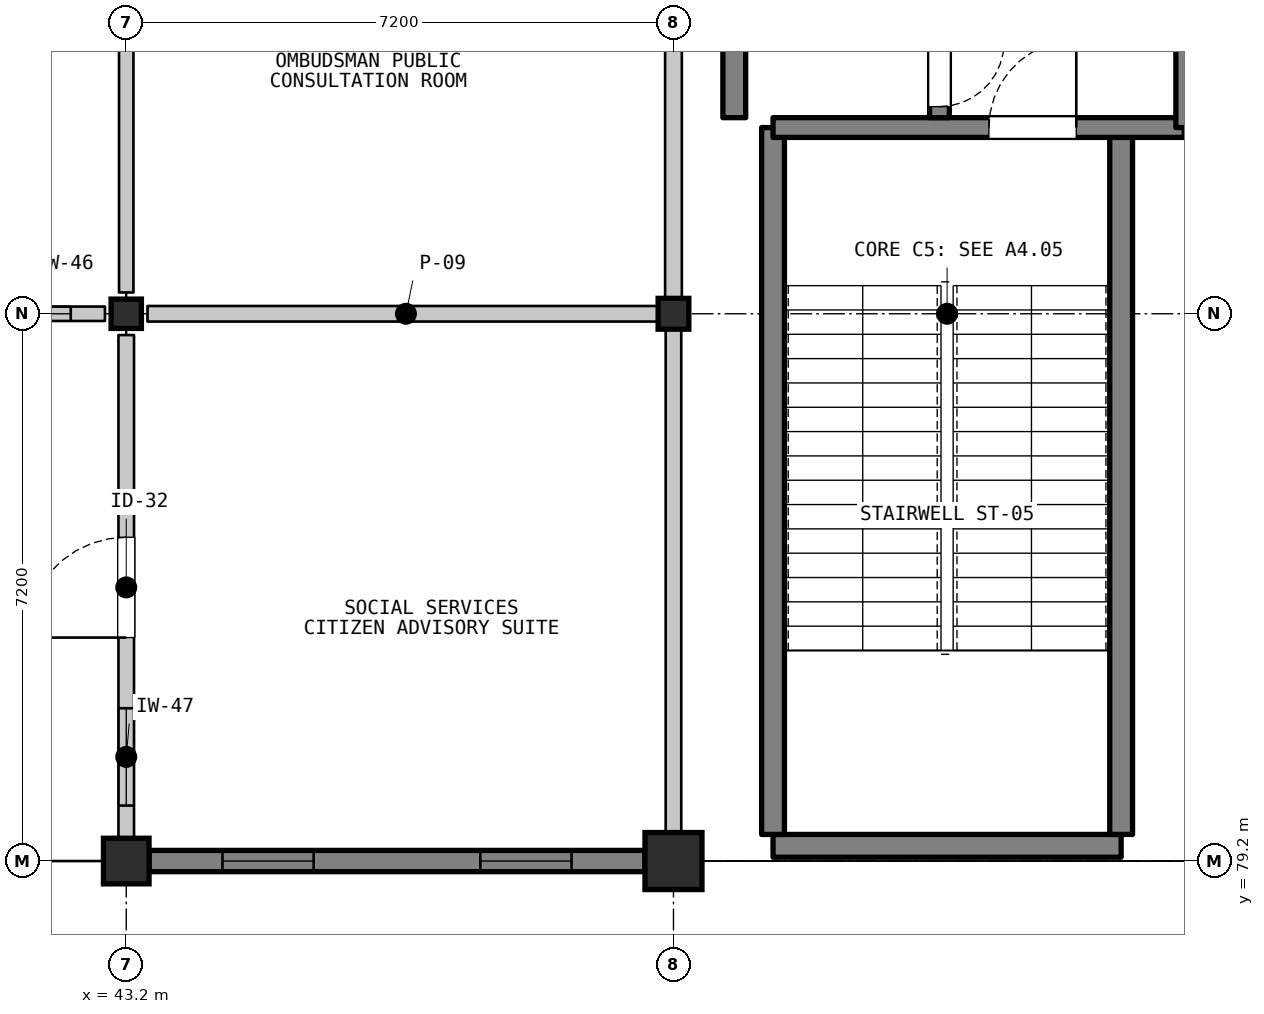
"""IFC4 building model, lengths in metres.
Left out: names, types, materials, properties, quantities, classifications, styles, units other than length and angle.
Written with IfcOpenShell. Run it as: python <this file> out.ifc"""

import sys

from ifc_helpers import new_model, si_unit, direction, frame, frame_2d, origin, origin_2d, place, context, subcontext, project, spatial, rectangle, i_section, extrude, element, fill, save


model = new_model("IFC4")
c1 = context("Model", 3, precision=1e-05, world=origin(), true_north=direction((0.0, 1.0)))
c2 = subcontext(c1, "Body", "Model", "MODEL_VIEW")
j1 = project(units=[si_unit("LENGTHUNIT", "METRE"), si_unit("PLANEANGLEUNIT", "RADIAN")], contexts=[c1])
p1 = place(None, origin())
s1 = spatial("IfcSite", under=j1, at=p1, CompositionType="ELEMENT")
p2 = place(p1, origin())
s2 = spatial("IfcBuilding", under=s1, at=p2, CompositionType="ELEMENT")
p3 = place(p2, origin())
s3 = spatial("IfcBuildingStorey", under=s2, at=p3, CompositionType="ELEMENT", Elevation=0.0)
p4 = place(p3, frame((43.2, 79.2, 0.0), z_axis=(0.0, 0.0, 1.0), x_axis=(1.0, 0.0, 0.0)))
e1 = element("IfcColumn", 1, at=p4, inside=s3, PredefinedType="COLUMN", context=c2, shape_type="SweptSolid", body=[
    extrude(rectangle(XDim=0.6, YDim=0.6, at=origin_2d()), origin(), (0.0, 0.0, 1.0), 5.4),
])
p5 = place(p3, frame((43.2, 86.4, 0.0), z_axis=(0.0, 0.0, 1.0), x_axis=(1.0, 0.0, 0.0)))
e2 = element("IfcColumn", 2, at=p5, inside=s3, PredefinedType="COLUMN", context=c2, shape_type="SweptSolid", body=[
    extrude(i_section(OverallWidth=0.399, OverallDepth=0.386, WebThickness=0.021, FlangeThickness=0.033, FilletRadius=0.015, at=origin_2d()), origin(), (0.0, 0.0, 1.0), 5.4),
])
p6 = place(p3, frame((50.4, 79.2, 0.0), z_axis=(0.0, 0.0, 1.0), x_axis=(1.0, 0.0, 0.0)))
e3 = element("IfcColumn", 3, at=p6, inside=s3, PredefinedType="COLUMN", context=c2, shape_type="SweptSolid", body=[
    extrude(rectangle(XDim=0.75, YDim=0.75, at=origin_2d()), origin(), (0.0, 0.0, 1.0), 5.4),
])
p7 = place(p3, frame((50.4, 86.4, 0.0), z_axis=(0.0, 0.0, 1.0), x_axis=(1.0, 0.0, 0.0)))
e4 = element("IfcColumn", 4, at=p7, inside=s3, PredefinedType="COLUMN", context=c2, shape_type="SweptSolid", body=[
    extrude(i_section(OverallWidth=0.404, OverallDepth=0.406, WebThickness=0.027, FlangeThickness=0.044, FilletRadius=0.015, at=origin_2d()), origin(), (0.0, 0.0, 1.0), 5.4),
])
p8 = place(p3, frame((50.025, 79.2, 0.0), z_axis=(0.0, 0.0, 1.0), x_axis=(-1.0, 0.0, 0.0)))
e5 = element("IfcWall", 5, at=p8, inside=s3, PredefinedType="SOLIDWALL", context=c2, shape_type="SweptSolid", body=[
    extrude(rectangle(XDim=6.525, YDim=0.28, at=frame_2d((3.262, 0.0))), origin(), (0.0, 0.0, 1.0), 4.598),
])
p9 = place(p8, frame((0.966, 0.0, 0.95)))
e6 = element("IfcOpeningElement", 6, at=p9, cuts=e5, PredefinedType="OPENING", context=c2, shape_type="SweptSolid", body=[
    extrude(rectangle(XDim=1.2, YDim=1.7, at=frame_2d((0.6, 0.85))), frame((0.0, 0.15, 0.0), z_axis=(0.0, -1.0, 0.0), x_axis=(1.0, 0.0, 0.0)), (0.0, 0.0, 1.0), 0.3),
])
p10 = place(p8, frame((4.359, 0.0, 0.95)))
e7 = element("IfcOpeningElement", 7, at=p10, cuts=e5, PredefinedType="OPENING", context=c2, shape_type="SweptSolid", body=[
    extrude(rectangle(XDim=1.2, YDim=1.7, at=frame_2d((0.6, 0.85))), frame((0.0, 0.15, 0.0), z_axis=(0.0, -1.0, 0.0), x_axis=(1.0, 0.0, 0.0)), (0.0, 0.0, 1.0), 0.3),
])
p11 = place(p3, frame((51.71, 79.4, 0.0), z_axis=(0.0, 0.0, 1.0), x_axis=(1.0, 0.0, 0.0)))
e8 = element("IfcWall", 8, at=p11, inside=s3, PredefinedType="SHEAR", context=c2, shape_type="SweptSolid", body=[
    extrude(rectangle(XDim=4.58, YDim=0.3, at=frame_2d((2.29, 0.0))), origin(), (0.0, 0.0, 1.0), 5.2),
])
for number, where, z_axis, x_axis in (
    (9, (51.71, 79.55, 0.0), (0.0, 0.0, 1.0), (0.0, 1.0, 0.0)),
    (10, (56.29, 79.55, 0.0), (0.0, 0.0, 1.0), (0.0, 1.0, 0.0)),
):
    element("IfcWall", number, at=place(p3, frame(where, z_axis=z_axis, x_axis=x_axis)), inside=s3, PredefinedType="SHEAR", context=c2, shape_type="SweptSolid", body=[
        extrude(rectangle(XDim=9.3, YDim=0.3, at=frame_2d((4.65, 0.0))), origin(), (0.0, 0.0, 1.0), 5.2),
    ])
p12 = place(p3, frame((51.71, 88.85, 0.0), z_axis=(0.0, 0.0, 1.0), x_axis=(1.0, 0.0, 0.0)))
e11 = element("IfcWall", 11, at=p12, inside=s3, PredefinedType="SHEAR", context=c2, shape_type="SweptSolid", body=[
    extrude(rectangle(XDim=5.41, YDim=0.26, at=frame_2d((2.705, 0.0))), origin(), (0.0, 0.0, 1.0), 5.2),
])
p13 = place(p12, frame((2.84, 0.0, 0.0)))
e12 = element("IfcOpeningElement", 12, at=p13, cuts=e11, PredefinedType="OPENING", context=c2, shape_type="SweptSolid", body=[
    extrude(rectangle(XDim=1.15, YDim=2.15, at=frame_2d((0.575, 1.075))), frame((0.0, 0.14, 0.0), z_axis=(0.0, -1.0, 0.0), x_axis=(1.0, 0.0, 0.0)), (0.0, 0.0, 1.0), 0.28),
])
p14 = place(p3, frame((51.2, 88.98, 0.0), z_axis=(0.0, 0.0, 1.0), x_axis=(0.0, 1.0, 0.0)))
e13 = element("IfcWall", 13, at=p14, inside=s3, PredefinedType="SHEAR", context=c2, shape_type="SweptSolid", body=[
    extrude(rectangle(XDim=4.32, YDim=0.3, at=frame_2d((2.16, 0.0))), origin(), (0.0, 0.0, 1.0), 5.2),
])
p15 = place(p3, frame((53.9, 93.3, 0.0), z_axis=(0.0, 0.0, 1.0), x_axis=(0.0, -1.0, 0.0)))
e14 = element("IfcWall", 14, at=p15, inside=s3, PredefinedType="SHEAR", context=c2, shape_type="SweptSolid", body=[
    extrude(rectangle(XDim=4.32, YDim=0.26, at=frame_2d((2.16, 0.0))), origin(), (0.0, 0.0, 1.0), 5.2),
])
p16 = place(p15, frame((1.05, 0.0, 0.0)))
e15 = element("IfcOpeningElement", 15, at=p16, cuts=e14, PredefinedType="OPENING", context=c2, shape_type="SweptSolid", body=[
    extrude(rectangle(XDim=1.1, YDim=2.15, at=frame_2d((0.55, 1.075))), frame((0.0, 0.14, 0.0), z_axis=(0.0, -1.0, 0.0), x_axis=(1.0, 0.0, 0.0)), (0.0, 0.0, 1.0), 0.28),
])
p17 = place(p15, frame((3.325, 0.0, 0.0)))
e16 = element("IfcOpeningElement", 16, at=p17, cuts=e14, PredefinedType="OPENING", context=c2, shape_type="SweptSolid", body=[
    extrude(rectangle(XDim=0.85, YDim=2.05, at=frame_2d((0.425, 1.025))), frame((0.0, 0.14, 0.0), z_axis=(0.0, -1.0, 0.0), x_axis=(1.0, 0.0, 0.0)), (0.0, 0.0, 1.0), 0.28),
])
p18 = place(p3, frame((57.12, 93.3, 0.0), z_axis=(0.0, 0.0, 1.0), x_axis=(0.0, -1.0, 0.0)))
e17 = element("IfcWall", 17, at=p18, inside=s3, PredefinedType="SHEAR", context=c2, shape_type="SweptSolid", body=[
    extrude(rectangle(XDim=4.45, YDim=0.22, at=frame_2d((2.225, 0.0))), origin(), (0.0, 0.0, 1.0), 5.2),
])
p19 = place(p18, frame((1.625, 0.0, 0.0)))
e18 = element("IfcOpeningElement", 18, at=p19, cuts=e17, PredefinedType="OPENING", context=c2, shape_type="SweptSolid", body=[
    extrude(rectangle(XDim=1.45, YDim=2.2, at=frame_2d((0.725, 1.1))), frame((0.0, 0.12, 0.0), z_axis=(0.0, -1.0, 0.0), x_axis=(1.0, 0.0, 0.0)), (0.0, 0.0, 1.0), 0.24),
])
p20 = place(p3, frame((42.92, 86.4, 0.0), z_axis=(0.0, 0.0, 1.0), x_axis=(-1.0, 0.0, 0.0)))
e19 = element("IfcWall", 19, at=p20, inside=s3, PredefinedType="PARTITIONING", context=c2, shape_type="SweptSolid", body=[
    extrude(rectangle(XDim=6.8, YDim=0.19, at=frame_2d((3.4, 0.0))), origin(), (0.0, 0.0, 1.0), 4.588),
])
p21 = place(p20, frame((2.55, 0.0, 0.0)))
e20 = element("IfcOpeningElement", 20, at=p21, cuts=e19, PredefinedType="OPENING", context=c2, shape_type="SweptSolid", body=[
    extrude(rectangle(XDim=1.7, YDim=2.35, at=frame_2d((0.85, 1.175))), frame((0.0, 0.105, 0.0), z_axis=(0.0, -1.0, 0.0), x_axis=(1.0, 0.0, 0.0)), (0.0, 0.0, 1.0), 0.21),
])
p22 = place(p20, frame((0.45, 0.0, 1.05)))
e21 = element("IfcOpeningElement", 21, at=p22, cuts=e19, PredefinedType="OPENING", context=c2, shape_type="SweptSolid", body=[
    extrude(rectangle(XDim=1.18, YDim=1.44, at=frame_2d((0.59, 0.72))), frame((0.0, 0.105, 0.0), z_axis=(0.0, -1.0, 0.0), x_axis=(1.0, 0.0, 0.0)), (0.0, 0.0, 1.0), 0.21),
])
p23 = place(p3, frame((43.2, 93.32, 0.0), z_axis=(0.0, 0.0, 1.0), x_axis=(0.0, -1.0, 0.0)))
e22 = element("IfcWall", 22, at=p23, inside=s3, PredefinedType="PARTITIONING", context=c2, shape_type="SweptSolid", body=[
    extrude(rectangle(XDim=6.64, YDim=0.19, at=frame_2d((3.32, 0.0))), origin(), (0.0, 0.0, 1.0), 4.657),
])
p24 = place(p3, frame((43.2, 79.48, 0.0), z_axis=(0.0, 0.0, 1.0), x_axis=(0.0, 1.0, 0.0)))
e23 = element("IfcWall", 23, at=p24, inside=s3, PredefinedType="PARTITIONING", context=c2, shape_type="SweptSolid", body=[
    extrude(rectangle(XDim=6.64, YDim=0.205, at=frame_2d((3.32, 0.0))), origin(), (0.0, 0.0, 1.0), 4.657),
])
p25 = place(p24, frame((2.66, 0.0, 0.0)))
e24 = element("IfcOpeningElement", 24, at=p25, cuts=e23, PredefinedType="OPENING", context=c2, shape_type="SweptSolid", body=[
    extrude(rectangle(XDim=1.32, YDim=2.24, at=frame_2d((0.66, 1.12))), frame((0.0, 0.113, 0.0), z_axis=(0.0, -1.0, 0.0), x_axis=(1.0, 0.0, 0.0)), (0.0, 0.0, 1.0), 0.225),
])
p26 = place(p24, frame((0.45, 0.0, 1.05)))
e25 = element("IfcOpeningElement", 25, at=p26, cuts=e23, PredefinedType="OPENING", context=c2, shape_type="SweptSolid", body=[
    extrude(rectangle(XDim=1.28, YDim=1.44, at=frame_2d((0.64, 0.72))), frame((0.0, 0.113, 0.0), z_axis=(0.0, -1.0, 0.0), x_axis=(1.0, 0.0, 0.0)), (0.0, 0.0, 1.0), 0.225),
])
p27 = place(p3, frame((43.48, 86.4, 0.0), z_axis=(0.0, 0.0, 1.0), x_axis=(1.0, 0.0, 0.0)))
e26 = element("IfcWall", 26, at=p27, inside=s3, PredefinedType="PARTITIONING", context=c2, shape_type="SweptSolid", body=[
    extrude(rectangle(XDim=6.8, YDim=0.205, at=frame_2d((3.4, 0.0))), origin(), (0.0, 0.0, 1.0), 4.588),
])
p28 = place(p3, frame((50.4, 86.28, 0.0), z_axis=(0.0, 0.0, 1.0), x_axis=(0.0, -1.0, 0.0)))
e27 = element("IfcWall", 27, at=p28, inside=s3, PredefinedType="PARTITIONING", context=c2, shape_type="SweptSolid", body=[
    extrude(rectangle(XDim=6.96, YDim=0.205, at=frame_2d((3.48, 0.0))), origin(), (0.0, 0.0, 1.0), 4.588),
])
p29 = place(p3, frame((50.4, 93.48, 0.0), z_axis=(0.0, 0.0, 1.0), x_axis=(0.0, -1.0, 0.0)))
e28 = element("IfcWall", 28, at=p29, inside=s3, PredefinedType="PARTITIONING", context=c2, shape_type="SweptSolid", body=[
    extrude(rectangle(XDim=6.96, YDim=0.22, at=frame_2d((3.48, 0.0))), origin(), (0.0, 0.0, 1.0), 4.588),
])
p30 = place(p9, origin())
e29 = element("IfcWindow", 29, at=p30, inside=s3, PartitioningType="SINGLE_PANEL", PredefinedType="WINDOW", context=c2, shape_type="SweptSolid", body=[
    extrude(rectangle(XDim=1.2, YDim=1.7, at=frame_2d((0.6, 0.85))), frame((0.0, 0.03, 0.0), z_axis=(0.0, -1.0, 0.0), x_axis=(1.0, 0.0, 0.0)), (0.0, 0.0, 1.0), 0.06),
])
fill(e6, e29)
p31 = place(p10, origin())
e30 = element("IfcWindow", 30, at=p31, inside=s3, PartitioningType="SINGLE_PANEL", PredefinedType="WINDOW", context=c2, shape_type="SweptSolid", body=[
    extrude(rectangle(XDim=1.2, YDim=1.7, at=frame_2d((0.6, 0.85))), frame((0.0, 0.03, 0.0), z_axis=(0.0, -1.0, 0.0), x_axis=(1.0, 0.0, 0.0)), (0.0, 0.0, 1.0), 0.06),
])
fill(e7, e30)
p32 = place(p13, origin())
e31 = element("IfcDoor", 31, at=p32, inside=s3, OperationType="SINGLE_SWING_RIGHT", PredefinedType="DOOR", context=c2, shape_type="SweptSolid", body=[
    extrude(rectangle(XDim=1.15, YDim=2.15, at=frame_2d((0.575, 1.075))), frame((0.0, 0.025, 0.0), z_axis=(0.0, -1.0, 0.0), x_axis=(1.0, 0.0, 0.0)), (0.0, 0.0, 1.0), 0.05),
])
fill(e12, e31)
p33 = place(p17, origin())
e32 = element("IfcDoor", 32, at=p33, inside=s3, OperationType="SINGLE_SWING_LEFT", PredefinedType="DOOR", context=c2, shape_type="SweptSolid", body=[
    extrude(rectangle(XDim=0.85, YDim=2.05, at=frame_2d((0.425, 1.025))), frame((0.0, 0.025, 0.0), z_axis=(0.0, -1.0, 0.0), x_axis=(1.0, 0.0, 0.0)), (0.0, 0.0, 1.0), 0.05),
])
fill(e16, e32)
p34 = place(p22, origin())
e33 = element("IfcWindow", 33, at=p34, inside=s3, PartitioningType="SINGLE_PANEL", PredefinedType="WINDOW", context=c2, shape_type="SweptSolid", body=[
    extrude(rectangle(XDim=1.18, YDim=1.44, at=frame_2d((0.59, 0.72))), frame((0.0, 0.03, 0.0), z_axis=(0.0, -1.0, 0.0), x_axis=(1.0, 0.0, 0.0)), (0.0, 0.0, 1.0), 0.06),
])
fill(e21, e33)
p35 = place(p25, origin())
e34 = element("IfcDoor", 34, at=p35, inside=s3, OperationType="SINGLE_SWING_LEFT", PredefinedType="DOOR", context=c2, shape_type="SweptSolid", body=[
    extrude(rectangle(XDim=1.32, YDim=2.24, at=frame_2d((0.66, 1.12))), frame((0.0, 0.025, 0.0), z_axis=(0.0, -1.0, 0.0), x_axis=(1.0, 0.0, 0.0)), (0.0, 0.0, 1.0), 0.05),
])
fill(e24, e34)
p36 = place(p26, origin())
e35 = element("IfcWindow", 35, at=p36, inside=s3, PartitioningType="SINGLE_PANEL", PredefinedType="WINDOW", context=c2, shape_type="SweptSolid", body=[
    extrude(rectangle(XDim=1.28, YDim=1.44, at=frame_2d((0.64, 0.72))), frame((0.0, 0.03, 0.0), z_axis=(0.0, -1.0, 0.0), x_axis=(1.0, 0.0, 0.0)), (0.0, 0.0, 1.0), 0.06),
])
fill(e25, e35)
save(model, sys.argv[1])
